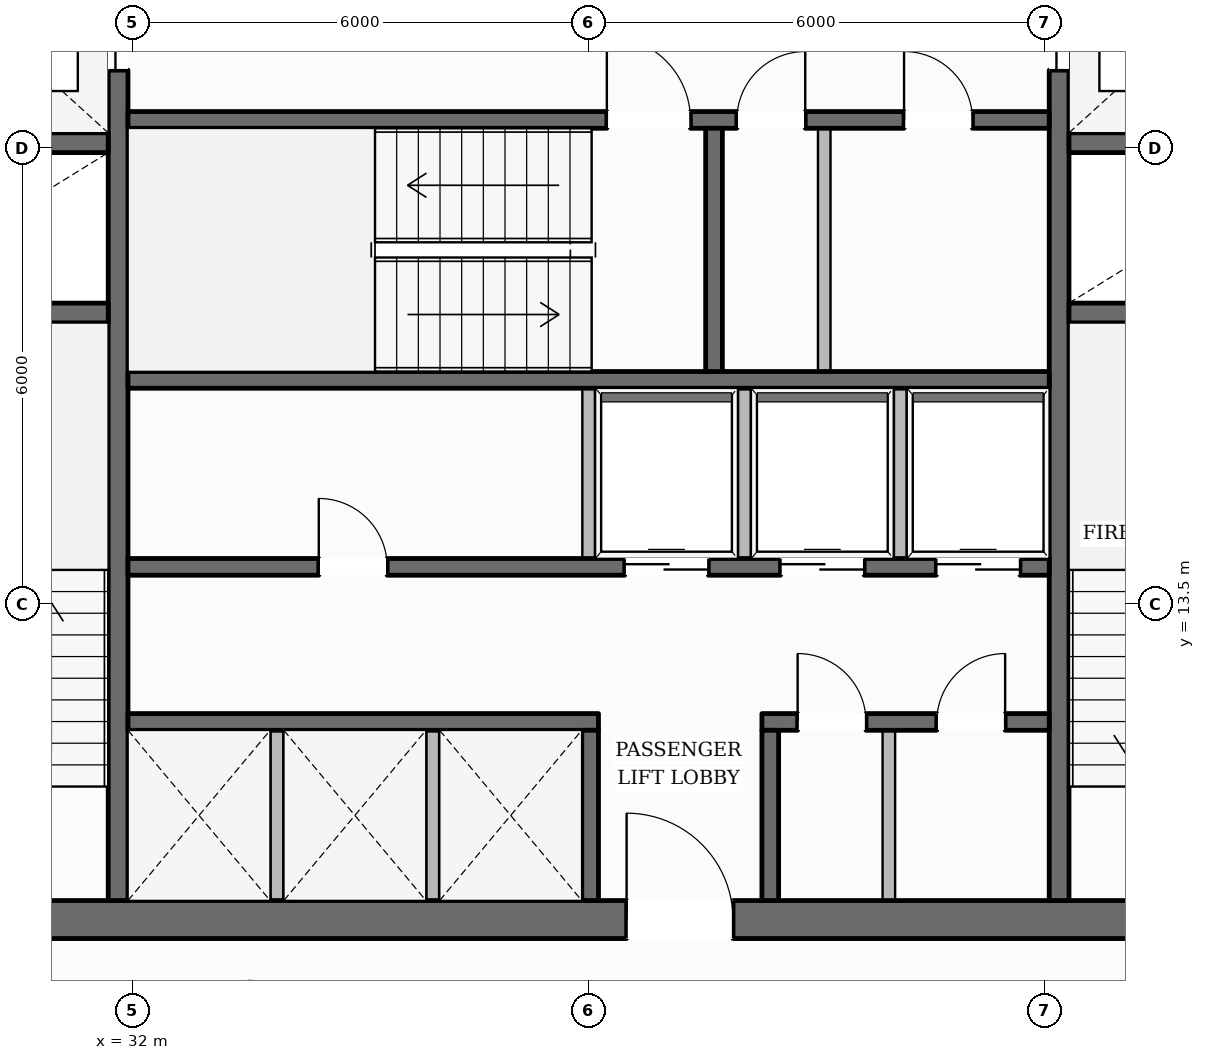
"""IFC4 building model, lengths in metres.
Left out: names, types, materials, properties, quantities, classifications, styles, units other than length and angle.
Written with IfcOpenShell. Run it as: python <this file> out.ifc"""

import sys

from ifc_helpers import new_model, si_unit, direction, frame, frame_2d, origin, place, context, subcontext, project, spatial, rectangle, extrude, element, fill, save


model = new_model("IFC4")
c1 = context("Model", 3, precision=1e-05, world=origin(), true_north=direction((0.0, 1.0)))
c2 = subcontext(c1, "Body", "Model", "MODEL_VIEW")
j1 = project(units=[si_unit("LENGTHUNIT", "METRE"), si_unit("PLANEANGLEUNIT", "RADIAN")], contexts=[c1])
p1 = place(None, origin())
s1 = spatial("IfcSite", under=j1, at=p1, CompositionType="ELEMENT")
p2 = place(p1, origin())
s2 = spatial("IfcBuilding", under=s1, at=p2, CompositionType="ELEMENT")
p3 = place(p2, frame((0.0, 0.0, 112.45)))
s3 = spatial("IfcBuildingStorey", under=s2, at=p3, CompositionType="ELEMENT", Elevation=112.45)
p4 = place(p3, frame((27.98, 9.35, 0.0), z_axis=(0.0, 0.0, 1.0), x_axis=(1.0, 0.0, 0.0)))
e1 = element("IfcWall", 1, at=p4, inside=s3, PredefinedType="SOLIDWALL", context=c2, shape_type="SweptSolid", body=[
    extrude(rectangle(XDim=20.04, YDim=0.5, at=frame_2d((10.02, 0.0))), origin(), (0.0, 0.0, 1.0), 3.6),
])
p5 = place(p4, frame((10.52, 0.0, 0.0)))
e2 = element("IfcOpeningElement", 2, at=p5, cuts=e1, PredefinedType="OPENING", context=c2, shape_type="SweptSolid", body=[
    extrude(rectangle(XDim=1.4, YDim=2.2, at=frame_2d((0.7, 1.1))), frame((0.0, 0.26, 0.0), z_axis=(0.0, -1.0, 0.0), x_axis=(1.0, 0.0, 0.0)), (0.0, 0.0, 1.0), 0.52),
])
p6 = place(p3, frame((31.81, 9.6, 0.0), z_axis=(0.0, 0.0, 1.0), x_axis=(0.0, 1.0, 0.0)))
e3 = element("IfcWall", 3, at=p6, inside=s3, PredefinedType="SHEAR", context=c2, shape_type="SweptSolid", body=[
    extrude(rectangle(XDim=13.0, YDim=0.26, at=frame_2d((6.5, 0.0))), origin(), (0.0, 0.0, 1.0), 3.6),
])
p7 = place(p6, frame((10.925, 0.0, 0.0)))
e4 = element("IfcOpeningElement", 4, at=p7, cuts=e3, PredefinedType="OPENING", context=c2, shape_type="SweptSolid", body=[
    extrude(rectangle(XDim=1.25, YDim=2.25, at=frame_2d((0.625, 1.125))), frame((0.0, 0.14, 0.0), z_axis=(0.0, -1.0, 0.0), x_axis=(1.0, 0.0, 0.0)), (0.0, 0.0, 1.0), 0.28),
])
p8 = place(p3, frame((44.19, 9.6, 0.0), z_axis=(0.0, 0.0, 1.0), x_axis=(0.0, 1.0, 0.0)))
e5 = element("IfcWall", 5, at=p8, inside=s3, PredefinedType="SHEAR", context=c2, shape_type="SweptSolid", body=[
    extrude(rectangle(XDim=13.0, YDim=0.26, at=frame_2d((6.5, 0.0))), origin(), (0.0, 0.0, 1.0), 3.6),
])
p9 = place(p8, frame((10.925, 0.0, 0.0)))
e6 = element("IfcOpeningElement", 6, at=p9, cuts=e5, PredefinedType="OPENING", context=c2, shape_type="SweptSolid", body=[
    extrude(rectangle(XDim=1.25, YDim=2.25, at=frame_2d((0.625, 1.125))), frame((0.0, 0.14, 0.0), z_axis=(0.0, -1.0, 0.0), x_axis=(1.0, 0.0, 0.0)), (0.0, 0.0, 1.0), 0.28),
])
for number, where, z_axis, x_axis in (
    (7, (28.48, 17.33, 0.0), (0.0, 0.0, 1.0), (1.0, 0.0, 0.0)),
    (8, (28.48, 19.57, 0.0), (0.0, 0.0, 1.0), (1.0, 0.0, 0.0)),
    (9, (44.32, 17.33, 0.0), (0.0, 0.0, 1.0), (1.0, 0.0, 0.0)),
    (10, (44.32, 19.57, 0.0), (0.0, 0.0, 1.0), (1.0, 0.0, 0.0)),
):
    element("IfcWall", number, at=place(p3, frame(where, z_axis=z_axis, x_axis=x_axis)), inside=s3, PredefinedType="SHEAR", context=c2, shape_type="SweptSolid", body=[
        extrude(rectangle(XDim=3.2, YDim=0.26, at=frame_2d((1.6, 0.0))), origin(), (0.0, 0.0, 1.0), 3.6),
    ])
p10 = place(p3, frame((31.94, 19.87, 0.0), z_axis=(0.0, 0.0, 1.0), x_axis=(1.0, 0.0, 0.0)))
e11 = element("IfcWall", 11, at=p10, inside=s3, PredefinedType="SOLIDWALL", context=c2, shape_type="SweptSolid", body=[
    extrude(rectangle(XDim=12.12, YDim=0.22, at=frame_2d((6.06, 0.0))), origin(), (0.0, 0.0, 1.0), 3.6),
])
p11 = place(p10, frame((6.3, 0.0, 0.0)))
e12 = element("IfcOpeningElement", 12, at=p11, cuts=e11, PredefinedType="OPENING", context=c2, shape_type="SweptSolid", body=[
    extrude(rectangle(XDim=1.1, YDim=2.15, at=frame_2d((0.55, 1.075))), frame((0.0, 0.12, 0.0), z_axis=(0.0, -1.0, 0.0), x_axis=(1.0, 0.0, 0.0)), (0.0, 0.0, 1.0), 0.24),
])
p12 = place(p10, frame((8.01, 0.0, 0.0)))
e13 = element("IfcOpeningElement", 13, at=p12, cuts=e11, PredefinedType="OPENING", context=c2, shape_type="SweptSolid", body=[
    extrude(rectangle(XDim=0.9, YDim=2.1, at=frame_2d((0.45, 1.05))), frame((0.0, 0.12, 0.0), z_axis=(0.0, -1.0, 0.0), x_axis=(1.0, 0.0, 0.0)), (0.0, 0.0, 1.0), 0.24),
])
p13 = place(p10, frame((10.21, 0.0, 0.0)))
e14 = element("IfcOpeningElement", 14, at=p13, cuts=e11, PredefinedType="OPENING", context=c2, shape_type="SweptSolid", body=[
    extrude(rectangle(XDim=0.9, YDim=2.1, at=frame_2d((0.45, 1.05))), frame((0.0, 0.12, 0.0), z_axis=(0.0, -1.0, 0.0), x_axis=(1.0, 0.0, 0.0)), (0.0, 0.0, 1.0), 0.24),
])
p14 = place(p3, frame((31.94, 16.45, 0.0), z_axis=(0.0, 0.0, 1.0), x_axis=(1.0, 0.0, 0.0)))
e15 = element("IfcWall", 15, at=p14, inside=s3, PredefinedType="SOLIDWALL", context=c2, shape_type="SweptSolid", body=[
    extrude(rectangle(XDim=12.12, YDim=0.22, at=frame_2d((6.06, 0.0))), origin(), (0.0, 0.0, 1.0), 3.6),
])
p15 = place(p3, frame((39.65, 16.56, 0.0), z_axis=(0.0, 0.0, 1.0), x_axis=(0.0, 1.0, 0.0)))
e16 = element("IfcWall", 16, at=p15, inside=s3, PredefinedType="SOLIDWALL", context=c2, shape_type="SweptSolid", body=[
    extrude(rectangle(XDim=3.2, YDim=0.22, at=frame_2d((1.6, 0.0))), origin(), (0.0, 0.0, 1.0), 3.6),
])
p16 = place(p3, frame((31.94, 13.99, 0.0), z_axis=(0.0, 0.0, 1.0), x_axis=(1.0, 0.0, 0.0)))
e17 = element("IfcWall", 17, at=p16, inside=s3, PredefinedType="SOLIDWALL", context=c2, shape_type="SweptSolid", body=[
    extrude(rectangle(XDim=12.12, YDim=0.22, at=frame_2d((6.06, 0.0))), origin(), (0.0, 0.0, 1.0), 3.6),
])
p17 = place(p16, frame((2.51, 0.0, 0.0)))
e18 = element("IfcOpeningElement", 18, at=p17, cuts=e17, PredefinedType="OPENING", context=c2, shape_type="SweptSolid", body=[
    extrude(rectangle(XDim=0.9, YDim=2.1, at=frame_2d((0.45, 1.05))), frame((0.0, 0.12, 0.0), z_axis=(0.0, -1.0, 0.0), x_axis=(1.0, 0.0, 0.0)), (0.0, 0.0, 1.0), 0.24),
])
p18 = place(p16, frame((6.535, 0.0, 0.0)))
e19 = element("IfcOpeningElement", 19, at=p18, cuts=e17, PredefinedType="OPENING", context=c2, shape_type="SweptSolid", body=[
    extrude(rectangle(XDim=1.1, YDim=2.2, at=frame_2d((0.55, 1.1))), frame((0.0, 0.12, 0.0), z_axis=(0.0, -1.0, 0.0), x_axis=(1.0, 0.0, 0.0)), (0.0, 0.0, 1.0), 0.24),
])
p19 = place(p16, frame((8.585, 0.0, 0.0)))
e20 = element("IfcOpeningElement", 20, at=p19, cuts=e17, PredefinedType="OPENING", context=c2, shape_type="SweptSolid", body=[
    extrude(rectangle(XDim=1.1, YDim=2.2, at=frame_2d((0.55, 1.1))), frame((0.0, 0.12, 0.0), z_axis=(0.0, -1.0, 0.0), x_axis=(1.0, 0.0, 0.0)), (0.0, 0.0, 1.0), 0.24),
])
p20 = place(p16, frame((10.635, 0.0, 0.0)))
e21 = element("IfcOpeningElement", 21, at=p20, cuts=e17, PredefinedType="OPENING", context=c2, shape_type="SweptSolid", body=[
    extrude(rectangle(XDim=1.1, YDim=2.2, at=frame_2d((0.55, 1.1))), frame((0.0, 0.12, 0.0), z_axis=(0.0, -1.0, 0.0), x_axis=(1.0, 0.0, 0.0)), (0.0, 0.0, 1.0), 0.24),
])
p21 = place(p3, frame((31.94, 11.95, 0.0), z_axis=(0.0, 0.0, 1.0), x_axis=(1.0, 0.0, 0.0)))
e22 = element("IfcWall", 22, at=p21, inside=s3, PredefinedType="SOLIDWALL", context=c2, shape_type="SweptSolid", body=[
    extrude(rectangle(XDim=6.19, YDim=0.22, at=frame_2d((3.095, 0.0))), origin(), (0.0, 0.0, 1.0), 3.6),
])
p22 = place(p3, frame((40.28, 11.95, 0.0), z_axis=(0.0, 0.0, 1.0), x_axis=(1.0, 0.0, 0.0)))
e23 = element("IfcWall", 23, at=p22, inside=s3, PredefinedType="SOLIDWALL", context=c2, shape_type="SweptSolid", body=[
    extrude(rectangle(XDim=3.78, YDim=0.22, at=frame_2d((1.89, 0.0))), origin(), (0.0, 0.0, 1.0), 3.6),
])
p23 = place(p22, frame((0.47, 0.0, 0.0)))
e24 = element("IfcOpeningElement", 24, at=p23, cuts=e23, PredefinedType="OPENING", context=c2, shape_type="SweptSolid", body=[
    extrude(rectangle(XDim=0.9, YDim=2.1, at=frame_2d((0.45, 1.05))), frame((0.0, 0.12, 0.0), z_axis=(0.0, -1.0, 0.0), x_axis=(1.0, 0.0, 0.0)), (0.0, 0.0, 1.0), 0.24),
])
p24 = place(p22, frame((2.3, 0.0, 0.0)))
e25 = element("IfcOpeningElement", 25, at=p24, cuts=e23, PredefinedType="OPENING", context=c2, shape_type="SweptSolid", body=[
    extrude(rectangle(XDim=0.9, YDim=2.1, at=frame_2d((0.45, 1.05))), frame((0.0, 0.12, 0.0), z_axis=(0.0, -1.0, 0.0), x_axis=(1.0, 0.0, 0.0)), (0.0, 0.0, 1.0), 0.24),
])
for number, where, z_axis, x_axis in (
    (26, (38.02, 9.6, 0.0), (0.0, 0.0, 1.0), (0.0, 1.0, 0.0)),
    (27, (40.39, 9.6, 0.0), (0.0, 0.0, 1.0), (0.0, 1.0, 0.0)),
):
    element("IfcWall", number, at=place(p3, frame(where, z_axis=z_axis, x_axis=x_axis)), inside=s3, PredefinedType="SOLIDWALL", context=c2, shape_type="SweptSolid", body=[
        extrude(rectangle(XDim=2.24, YDim=0.22, at=frame_2d((1.12, 0.0))), origin(), (0.0, 0.0, 1.0), 3.6),
    ])
p25 = place(p3, frame((14.144, 13.219, 0.0), z_axis=(0.0, 0.0, 1.0), x_axis=(0.494900960409, 0.868949388277, 0.0)))
e28 = element("IfcWall", 28, at=p25, inside=s3, PredefinedType="STANDARD", context=c2, shape_type="SweptSolid", body=[
    extrude(rectangle(XDim=36.225, YDim=0.38, at=frame_2d((18.113, 0.0))), origin(), (0.0, 0.0, 1.0), 3.059),
])
p26 = place(p25, frame((32.03, 0.0, 0.65)))
e29 = element("IfcOpeningElement", 29, at=p26, cuts=e28, PredefinedType="OPENING", context=c2, shape_type="SweptSolid", body=[
    extrude(rectangle(XDim=1.55, YDim=1.75, at=frame_2d((0.775, 0.875))), frame((0.0, 0.2, 0.0), z_axis=(0.0, -1.0, 0.0), x_axis=(1.0, 0.0, 0.0)), (0.0, 0.0, 1.0), 0.4),
])
p27 = place(p25, frame((26.152, 0.0, 0.65)))
e30 = element("IfcOpeningElement", 30, at=p27, cuts=e28, PredefinedType="OPENING", context=c2, shape_type="SweptSolid", body=[
    extrude(rectangle(XDim=1.55, YDim=1.75, at=frame_2d((0.775, 0.875))), frame((0.0, 0.2, 0.0), z_axis=(0.0, -1.0, 0.0), x_axis=(1.0, 0.0, 0.0)), (0.0, 0.0, 1.0), 0.4),
])
p28 = place(p25, frame((20.274, 0.0, 0.65)))
e31 = element("IfcOpeningElement", 31, at=p28, cuts=e28, PredefinedType="OPENING", context=c2, shape_type="SweptSolid", body=[
    extrude(rectangle(XDim=1.55, YDim=1.75, at=frame_2d((0.775, 0.875))), frame((0.0, 0.2, 0.0), z_axis=(0.0, -1.0, 0.0), x_axis=(1.0, 0.0, 0.0)), (0.0, 0.0, 1.0), 0.4),
])
p29 = place(p25, frame((8.518, 0.0, 0.65)))
e32 = element("IfcOpeningElement", 32, at=p29, cuts=e28, PredefinedType="OPENING", context=c2, shape_type="SweptSolid", body=[
    extrude(rectangle(XDim=1.55, YDim=1.75, at=frame_2d((0.775, 0.875))), frame((0.0, 0.2, 0.0), z_axis=(0.0, -1.0, 0.0), x_axis=(1.0, 0.0, 0.0)), (0.0, 0.0, 1.0), 0.4),
])
p30 = place(p25, frame((2.64, 0.0, 0.65)))
e33 = element("IfcOpeningElement", 33, at=p30, cuts=e28, PredefinedType="OPENING", context=c2, shape_type="SweptSolid", body=[
    extrude(rectangle(XDim=1.55, YDim=1.75, at=frame_2d((0.775, 0.875))), frame((0.0, 0.2, 0.0), z_axis=(0.0, -1.0, 0.0), x_axis=(1.0, 0.0, 0.0)), (0.0, 0.0, 1.0), 0.4),
])
p31 = place(p3, frame((44.076, 44.609, 0.0), z_axis=(0.0, 0.0, 1.0), x_axis=(0.500826973377, -0.865547423737, 0.0)))
e34 = element("IfcWall", 34, at=p31, inside=s3, PredefinedType="STANDARD", context=c2, shape_type="SweptSolid", body=[
    extrude(rectangle(XDim=36.65, YDim=0.38, at=frame_2d((18.325, 0.0))), origin(), (0.0, 0.0, 1.0), 3.059),
])
p32 = place(p31, frame((26.887, 0.0, 0.0)))
e35 = element("IfcOpeningElement", 35, at=p32, cuts=e34, PredefinedType="OPENING", context=c2, shape_type="SweptSolid", body=[
    extrude(rectangle(XDim=1.0, YDim=2.2, at=frame_2d((0.5, 1.1))), frame((0.0, 0.2, 0.0), z_axis=(0.0, -1.0, 0.0), x_axis=(1.0, 0.0, 0.0)), (0.0, 0.0, 1.0), 0.4),
])
p33 = place(p31, frame((32.424, 0.0, 0.65)))
e36 = element("IfcOpeningElement", 36, at=p33, cuts=e34, PredefinedType="OPENING", context=c2, shape_type="SweptSolid", body=[
    extrude(rectangle(XDim=1.55, YDim=1.75, at=frame_2d((0.775, 0.875))), frame((0.0, 0.2, 0.0), z_axis=(0.0, -1.0, 0.0), x_axis=(1.0, 0.0, 0.0)), (0.0, 0.0, 1.0), 0.4),
])
p34 = place(p31, frame((20.524, 0.0, 0.65)))
e37 = element("IfcOpeningElement", 37, at=p34, cuts=e34, PredefinedType="OPENING", context=c2, shape_type="SweptSolid", body=[
    extrude(rectangle(XDim=1.55, YDim=1.75, at=frame_2d((0.775, 0.875))), frame((0.0, 0.2, 0.0), z_axis=(0.0, -1.0, 0.0), x_axis=(1.0, 0.0, 0.0)), (0.0, 0.0, 1.0), 0.4),
])
p35 = place(p31, frame((8.625, 0.0, 0.65)))
e38 = element("IfcOpeningElement", 38, at=p35, cuts=e34, PredefinedType="OPENING", context=c2, shape_type="SweptSolid", body=[
    extrude(rectangle(XDim=1.55, YDim=1.75, at=frame_2d((0.775, 0.875))), frame((0.0, 0.2, 0.0), z_axis=(0.0, -1.0, 0.0), x_axis=(1.0, 0.0, 0.0)), (0.0, 0.0, 1.0), 0.4),
])
p36 = place(p31, frame((2.675, 0.0, 0.65)))
e39 = element("IfcOpeningElement", 39, at=p36, cuts=e34, PredefinedType="OPENING", context=c2, shape_type="SweptSolid", body=[
    extrude(rectangle(XDim=1.55, YDim=1.75, at=frame_2d((0.775, 0.875))), frame((0.0, 0.2, 0.0), z_axis=(0.0, -1.0, 0.0), x_axis=(1.0, 0.0, 0.0)), (0.0, 0.0, 1.0), 0.4),
])
for number, where, z_axis, x_axis in (
    (40, (33.9, 9.55, 0.0), (0.0, 0.0, 1.0), (0.0, 1.0, 0.0)),
    (41, (35.95, 9.55, 0.0), (0.0, 0.0, 1.0), (0.0, 1.0, 0.0)),
):
    element("IfcWall", number, at=place(p3, frame(where, z_axis=z_axis, x_axis=x_axis)), inside=s3, PredefinedType="PARTITIONING", context=c2, shape_type="SweptSolid", body=[
        extrude(rectangle(XDim=2.29, YDim=0.165, at=frame_2d((1.145, 0.0))), origin(), (0.0, 0.0, 1.0), 3.6),
    ])
for number, where, z_axis, x_axis in (
    (42, (38.0, 14.1, 0.0), (0.0, 0.0, 1.0), (0.0, 1.0, 0.0)),
    (43, (40.05, 14.1, 0.0), (0.0, 0.0, 1.0), (0.0, 1.0, 0.0)),
    (44, (42.1, 14.1, 0.0), (0.0, 0.0, 1.0), (0.0, 1.0, 0.0)),
):
    element("IfcWall", number, at=place(p3, frame(where, z_axis=z_axis, x_axis=x_axis)), inside=s3, PredefinedType="PARTITIONING", context=c2, shape_type="SweptSolid", body=[
        extrude(rectangle(XDim=2.24, YDim=0.165, at=frame_2d((1.12, 0.0))), origin(), (0.0, 0.0, 1.0), 3.6),
    ])
p37 = place(p3, frame((41.1, 16.56, 0.0), z_axis=(0.0, 0.0, 1.0), x_axis=(0.0, 1.0, 0.0)))
e45 = element("IfcWall", 45, at=p37, inside=s3, PredefinedType="PARTITIONING", context=c2, shape_type="SweptSolid", body=[
    extrude(rectangle(XDim=3.2, YDim=0.165, at=frame_2d((1.6, 0.0))), origin(), (0.0, 0.0, 1.0), 3.6),
])
p38 = place(p3, frame((41.95, 9.55, 0.0), z_axis=(0.0, 0.0, 1.0), x_axis=(0.0, 1.0, 0.0)))
e46 = element("IfcWall", 46, at=p38, inside=s3, PredefinedType="PARTITIONING", context=c2, shape_type="SweptSolid", body=[
    extrude(rectangle(XDim=2.29, YDim=0.165, at=frame_2d((1.145, 0.0))), origin(), (0.0, 0.0, 1.0), 3.6),
])
p39 = place(p11, origin())
e47 = element("IfcDoor", 47, at=p39, inside=s3, OperationType="SINGLE_SWING_LEFT", PredefinedType="DOOR", context=c2, shape_type="SweptSolid", body=[
    extrude(rectangle(XDim=1.1, YDim=2.15, at=frame_2d((0.55, 1.075))), frame((0.0, 0.025, 0.0), z_axis=(0.0, -1.0, 0.0), x_axis=(1.0, 0.0, 0.0)), (0.0, 0.0, 1.0), 0.05),
])
fill(e12, e47)
p40 = place(p7, origin())
e48 = element("IfcDoor", 48, at=p40, inside=s3, OperationType="DOUBLE_DOOR_SLIDING", PredefinedType="DOOR", context=c2, shape_type="SweptSolid", body=[
    extrude(rectangle(XDim=1.25, YDim=2.25, at=frame_2d((0.625, 1.125))), frame((0.0, 0.025, 0.0), z_axis=(0.0, -1.0, 0.0), x_axis=(1.0, 0.0, 0.0)), (0.0, 0.0, 1.0), 0.05),
])
fill(e4, e48)
p41 = place(p9, origin())
e49 = element("IfcDoor", 49, at=p41, inside=s3, OperationType="DOUBLE_DOOR_SLIDING", PredefinedType="DOOR", context=c2, shape_type="SweptSolid", body=[
    extrude(rectangle(XDim=1.25, YDim=2.25, at=frame_2d((0.625, 1.125))), frame((0.0, 0.025, 0.0), z_axis=(0.0, -1.0, 0.0), x_axis=(1.0, 0.0, 0.0)), (0.0, 0.0, 1.0), 0.05),
])
fill(e6, e49)
p42 = place(p5, origin())
e50 = element("IfcDoor", 50, at=p42, inside=s3, OperationType="SINGLE_SWING_LEFT", PredefinedType="DOOR", context=c2, shape_type="SweptSolid", body=[
    extrude(rectangle(XDim=1.4, YDim=2.2, at=frame_2d((0.7, 1.1))), frame((0.0, 0.025, 0.0), z_axis=(0.0, -1.0, 0.0), x_axis=(1.0, 0.0, 0.0)), (0.0, 0.0, 1.0), 0.05),
])
fill(e2, e50)
p43 = place(p17, origin())
e51 = element("IfcDoor", 51, at=p43, inside=s3, OperationType="SINGLE_SWING_LEFT", PredefinedType="DOOR", context=c2, shape_type="SweptSolid", body=[
    extrude(rectangle(XDim=0.9, YDim=2.1, at=frame_2d((0.45, 1.05))), frame((0.0, 0.025, 0.0), z_axis=(0.0, -1.0, 0.0), x_axis=(1.0, 0.0, 0.0)), (0.0, 0.0, 1.0), 0.05),
])
fill(e18, e51)
p44 = place(p18, origin())
e52 = element("IfcDoor", 52, at=p44, inside=s3, OperationType="DOUBLE_DOOR_SLIDING", PredefinedType="DOOR", context=c2, shape_type="SweptSolid", body=[
    extrude(rectangle(XDim=1.1, YDim=2.2, at=frame_2d((0.55, 1.1))), frame((0.0, 0.025, 0.0), z_axis=(0.0, -1.0, 0.0), x_axis=(1.0, 0.0, 0.0)), (0.0, 0.0, 1.0), 0.05),
])
fill(e19, e52)
p45 = place(p19, origin())
e53 = element("IfcDoor", 53, at=p45, inside=s3, OperationType="DOUBLE_DOOR_SLIDING", PredefinedType="DOOR", context=c2, shape_type="SweptSolid", body=[
    extrude(rectangle(XDim=1.1, YDim=2.2, at=frame_2d((0.55, 1.1))), frame((0.0, 0.025, 0.0), z_axis=(0.0, -1.0, 0.0), x_axis=(1.0, 0.0, 0.0)), (0.0, 0.0, 1.0), 0.05),
])
fill(e20, e53)
p46 = place(p20, origin())
e54 = element("IfcDoor", 54, at=p46, inside=s3, OperationType="DOUBLE_DOOR_SLIDING", PredefinedType="DOOR", context=c2, shape_type="SweptSolid", body=[
    extrude(rectangle(XDim=1.1, YDim=2.2, at=frame_2d((0.55, 1.1))), frame((0.0, 0.025, 0.0), z_axis=(0.0, -1.0, 0.0), x_axis=(1.0, 0.0, 0.0)), (0.0, 0.0, 1.0), 0.05),
])
fill(e21, e54)
p47 = place(p12, origin())
e55 = element("IfcDoor", 55, at=p47, inside=s3, OperationType="SINGLE_SWING_RIGHT", PredefinedType="DOOR", context=c2, shape_type="SweptSolid", body=[
    extrude(rectangle(XDim=0.9, YDim=2.1, at=frame_2d((0.45, 1.05))), frame((0.0, 0.025, 0.0), z_axis=(0.0, -1.0, 0.0), x_axis=(1.0, 0.0, 0.0)), (0.0, 0.0, 1.0), 0.05),
])
fill(e13, e55)
p48 = place(p13, origin())
e56 = element("IfcDoor", 56, at=p48, inside=s3, OperationType="SINGLE_SWING_LEFT", PredefinedType="DOOR", context=c2, shape_type="SweptSolid", body=[
    extrude(rectangle(XDim=0.9, YDim=2.1, at=frame_2d((0.45, 1.05))), frame((0.0, 0.025, 0.0), z_axis=(0.0, -1.0, 0.0), x_axis=(1.0, 0.0, 0.0)), (0.0, 0.0, 1.0), 0.05),
])
fill(e14, e56)
p49 = place(p23, origin())
e57 = element("IfcDoor", 57, at=p49, inside=s3, OperationType="SINGLE_SWING_LEFT", PredefinedType="DOOR", context=c2, shape_type="SweptSolid", body=[
    extrude(rectangle(XDim=0.9, YDim=2.1, at=frame_2d((0.45, 1.05))), frame((0.0, 0.025, 0.0), z_axis=(0.0, -1.0, 0.0), x_axis=(1.0, 0.0, 0.0)), (0.0, 0.0, 1.0), 0.05),
])
fill(e24, e57)
p50 = place(p24, origin())
e58 = element("IfcDoor", 58, at=p50, inside=s3, OperationType="SINGLE_SWING_RIGHT", PredefinedType="DOOR", context=c2, shape_type="SweptSolid", body=[
    extrude(rectangle(XDim=0.9, YDim=2.1, at=frame_2d((0.45, 1.05))), frame((0.0, 0.025, 0.0), z_axis=(0.0, -1.0, 0.0), x_axis=(1.0, 0.0, 0.0)), (0.0, 0.0, 1.0), 0.05),
])
fill(e25, e58)
save(model, sys.argv[1])
